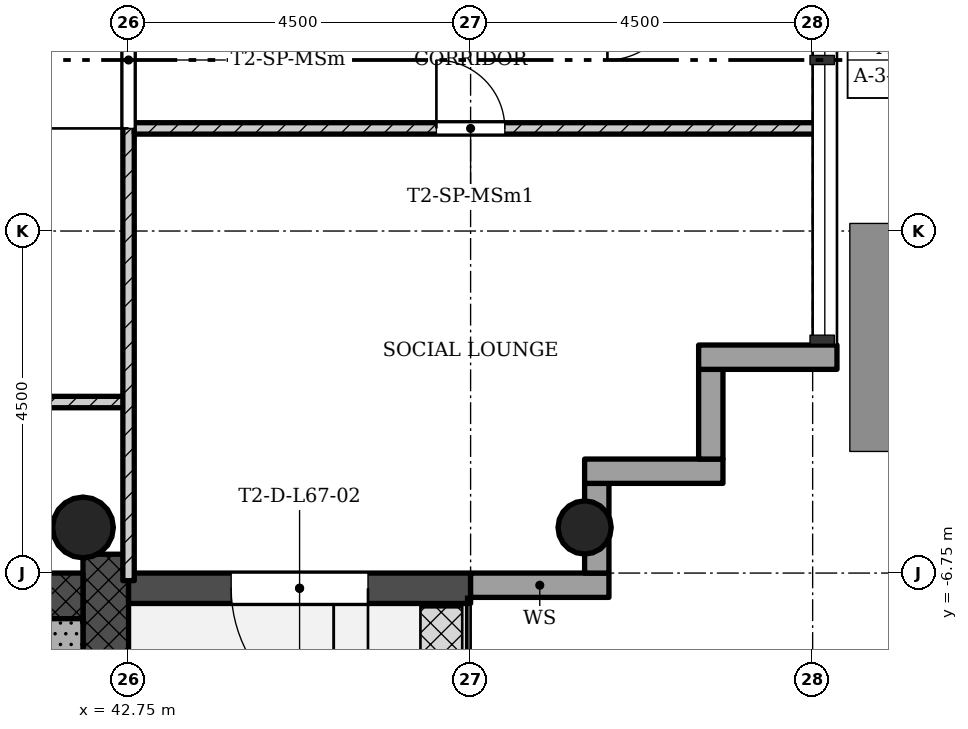
"""IFC4 building model, lengths in metres.
Left out: names, types, materials, properties, quantities, classifications, styles, units other than length and angle.
Written with IfcOpenShell. Run it as: python <this file> out.ifc"""

import sys

from ifc_helpers import new_model, si_unit, direction, frame, frame_2d, origin, origin_2d, place, context, subcontext, project, spatial, rectangle, hollow_circle, extrude, element, fill, save


model = new_model("IFC4")
c1 = context("Model", 3, precision=1e-05, world=origin(), true_north=direction((0.0, 1.0)))
c2 = subcontext(c1, "Body", "Model", "MODEL_VIEW")
j1 = project(units=[si_unit("LENGTHUNIT", "METRE"), si_unit("PLANEANGLEUNIT", "RADIAN")], contexts=[c1])
p1 = place(None, origin())
s1 = spatial("IfcSite", under=j1, at=p1, CompositionType="ELEMENT")
p2 = place(p1, origin())
s2 = spatial("IfcBuilding", under=s1, at=p2, CompositionType="ELEMENT")
p3 = place(p2, frame((0.0, 0.0, 242.4)))
s3 = spatial("IfcBuildingStorey", under=s2, at=p3, CompositionType="ELEMENT", Elevation=242.4)
p4 = place(p3, frame((42.45, -15.15, 0.0), z_axis=(0.0, 0.0, 1.0), x_axis=(0.0, 1.0, 0.0)))
e1 = element("IfcWall", 1, at=p4, inside=s3, PredefinedType="SHEAR", context=c2, shape_type="SweptSolid", body=[
    extrude(rectangle(XDim=8.648, YDim=0.6, at=frame_2d((4.324, 0.0))), origin(), (0.0, 0.0, 1.0), 4.5),
])
p5 = place(p3, frame((42.15, -7.05, 0.0), z_axis=(0.0, 0.0, 1.0), x_axis=(-1.0, 0.0, 0.0)))
e2 = element("IfcWall", 2, at=p5, inside=s3, PredefinedType="SHEAR", context=c2, shape_type="SweptSolid", body=[
    extrude(rectangle(XDim=12.9, YDim=0.6, at=frame_2d((6.45, 0.0))), origin(), (0.0, 0.0, 1.0), 4.5),
])
p6 = place(p5, frame((5.25, 0.0, 0.0)))
e3 = element("IfcOpeningElement", 3, at=p6, cuts=e2, PredefinedType="OPENING", context=c2, shape_type="SweptSolid", body=[
    extrude(rectangle(XDim=1.8, YDim=2.1, at=frame_2d((0.9, 1.05))), frame((0.0, 0.31, 0.0), z_axis=(0.0, -1.0, 0.0), x_axis=(1.0, 0.0, 0.0)), (0.0, 0.0, 1.0), 0.62),
])
p7 = place(p3, frame((48.75, -6.15, 0.0), z_axis=(0.0, 0.0, 1.0), x_axis=(1.0, 0.0, 0.0)))
e4 = element("IfcColumn", 4, at=p7, inside=s3, PredefinedType="COLUMN", context=c2, shape_type="SweptSolid", body=[
    extrude(hollow_circle(Radius=0.35, WallThickness=0.025, at=origin_2d()), origin(), (0.0, 0.0, 1.0), 4.5),
])
p8 = place(p3, frame((42.15, -6.15, 0.0), z_axis=(0.0, 0.0, 1.0), x_axis=(1.0, 0.0, 0.0)))
e5 = element("IfcColumn", 5, at=p8, inside=s3, PredefinedType="COLUMN", context=c2, shape_type="SweptSolid", body=[
    extrude(hollow_circle(Radius=0.4, WallThickness=0.028, at=origin_2d()), origin(), (0.0, 0.0, 1.0), 4.5),
])
p9 = place(p3, frame((42.75, -6.95, -0.02), z_axis=(0.0, 0.0, 1.0), x_axis=(1.0, 0.0, 0.0)))
e6 = element("IfcWall", 6, at=p9, inside=s3, PredefinedType="STANDARD", context=c2, shape_type="SweptSolid", body=[
    extrude(rectangle(XDim=4.5, YDim=0.4, at=frame_2d((2.25, 0.0))), origin(), (0.0, 0.0, 1.0), 4.22),
])
p10 = place(p9, frame((1.35, 0.0, 0.02)))
e7 = element("IfcOpeningElement", 7, at=p10, cuts=e6, PredefinedType="OPENING", context=c2, shape_type="SweptSolid", body=[
    extrude(rectangle(XDim=1.8, YDim=2.1, at=frame_2d((0.9, 1.05))), frame((0.0, 0.21, 0.0), z_axis=(0.0, -1.0, 0.0), x_axis=(1.0, 0.0, 0.0)), (0.0, 0.0, 1.0), 0.42),
])
p11 = place(p3, frame((47.25, -6.91, -0.3), z_axis=(0.0, 0.0, 1.0), x_axis=(1.0, 0.0, 0.0)))
e8 = element("IfcWall", 8, at=p11, inside=s3, PredefinedType="STANDARD", context=c2, shape_type="SweptSolid", body=[
    extrude(rectangle(XDim=1.82, YDim=0.32, at=frame_2d((0.91, 0.0))), origin(), (0.0, 0.0, 1.0), 4.5),
])
p12 = place(p3, frame((48.91, -6.75, -0.3), z_axis=(0.0, 0.0, 1.0), x_axis=(0.0, 1.0, 0.0)))
e9 = element("IfcWall", 9, at=p12, inside=s3, PredefinedType="STANDARD", context=c2, shape_type="SweptSolid", body=[
    extrude(rectangle(XDim=1.18, YDim=0.32, at=frame_2d((0.59, 0.0))), origin(), (0.0, 0.0, 1.0), 4.5),
])
p13 = place(p3, frame((48.75, -5.41, -0.3), z_axis=(0.0, 0.0, 1.0), x_axis=(1.0, 0.0, 0.0)))
e10 = element("IfcWall", 10, at=p13, inside=s3, PredefinedType="STANDARD", context=c2, shape_type="SweptSolid", body=[
    extrude(rectangle(XDim=1.82, YDim=0.32, at=frame_2d((0.91, 0.0))), origin(), (0.0, 0.0, 1.0), 4.5),
])
p14 = place(p3, frame((50.41, -5.25, -0.3), z_axis=(0.0, 0.0, 1.0), x_axis=(0.0, 1.0, 0.0)))
e11 = element("IfcWall", 11, at=p14, inside=s3, PredefinedType="STANDARD", context=c2, shape_type="SweptSolid", body=[
    extrude(rectangle(XDim=1.18, YDim=0.32, at=frame_2d((0.59, 0.0))), origin(), (0.0, 0.0, 1.0), 4.5),
])
p15 = place(p3, frame((50.25, -3.91, -0.3), z_axis=(0.0, 0.0, 1.0), x_axis=(1.0, 0.0, 0.0)))
e12 = element("IfcWall", 12, at=p15, inside=s3, PredefinedType="STANDARD", context=c2, shape_type="SweptSolid", body=[
    extrude(rectangle(XDim=1.82, YDim=0.32, at=frame_2d((0.91, 0.0))), origin(), (0.0, 0.0, 1.0), 4.5),
])
p16 = place(p3, frame((42.75, -4.5, 0.0), z_axis=(0.0, 0.0, 1.0), x_axis=(-1.0, 0.0, 0.0)))
e13 = element("IfcWall", 13, at=p16, inside=s3, PredefinedType="PARTITIONING", context=c2, shape_type="SweptSolid", body=[
    extrude(rectangle(XDim=4.5, YDim=0.15, at=frame_2d((2.25, 0.0))), origin(), (0.0, 0.0, 1.0), 4.08),
])
p17 = place(p16, frame((1.8, 0.0, 0.0)))
e14 = element("IfcOpeningElement", 14, at=p17, cuts=e13, PredefinedType="OPENING", context=c2, shape_type="SweptSolid", body=[
    extrude(rectangle(XDim=0.9, YDim=2.1, at=frame_2d((0.45, 1.05))), frame((0.0, 0.085, 0.0), z_axis=(0.0, -1.0, 0.0), x_axis=(1.0, 0.0, 0.0)), (0.0, 0.0, 1.0), 0.17),
])
p18 = place(p3, frame((42.75, -6.85, 0.0), z_axis=(0.0, 0.0, 1.0), x_axis=(0.0, 1.0, 0.0)))
e15 = element("IfcWall", 15, at=p18, inside=s3, PredefinedType="PARTITIONING", context=c2, shape_type="SweptSolid", body=[
    extrude(rectangle(XDim=13.7, YDim=0.15, at=frame_2d((6.85, 0.0))), origin(), (0.0, 0.0, 1.0), 4.08),
])
p19 = place(p18, frame((5.95, 0.0, 0.0)))
e16 = element("IfcOpeningElement", 16, at=p19, cuts=e15, PredefinedType="OPENING", context=c2, shape_type="SweptSolid", body=[
    extrude(rectangle(XDim=1.8, YDim=2.1, at=frame_2d((0.9, 1.05))), frame((0.0, 0.085, 0.0), z_axis=(0.0, -1.0, 0.0), x_axis=(1.0, 0.0, 0.0)), (0.0, 0.0, 1.0), 0.17),
])
p20 = place(p3, frame((51.85, -0.9, 0.0), z_axis=(0.0, 0.0, 1.0), x_axis=(-1.0, 0.0, 0.0)))
e17 = element("IfcWall", 17, at=p20, inside=s3, PredefinedType="PARTITIONING", context=c2, shape_type="SweptSolid", body=[
    extrude(rectangle(XDim=9.025, YDim=0.15, at=frame_2d((4.513, 0.0))), origin(), (0.0, 0.0, 1.0), 4.08),
])
p21 = place(p20, frame((4.15, 0.0, 0.0)))
e18 = element("IfcOpeningElement", 18, at=p21, cuts=e17, PredefinedType="OPENING", context=c2, shape_type="SweptSolid", body=[
    extrude(rectangle(XDim=0.9, YDim=2.1, at=frame_2d((0.45, 1.05))), frame((0.0, 0.085, 0.0), z_axis=(0.0, -1.0, 0.0), x_axis=(1.0, 0.0, 0.0)), (0.0, 0.0, 1.0), 0.17),
])
p22 = place(p3, frame((37.85, -7.65, 0.0), z_axis=(0.0, 0.0, 1.0), x_axis=(1.0, 0.0, 0.0)))
e19 = element("IfcWall", 19, at=p22, inside=s3, PredefinedType="SHEAR", context=c2, shape_type="SweptSolid", body=[
    extrude(rectangle(XDim=4.3, YDim=0.6, at=frame_2d((2.15, 0.0))), origin(), (0.0, 0.0, 1.0), 4.5),
])
p23 = place(p10, origin())
e20 = element("IfcDoor", 20, at=p23, inside=s3, OperationType="SINGLE_SWING_RIGHT", PredefinedType="DOOR", context=c2, shape_type="SweptSolid", body=[
    extrude(rectangle(XDim=1.8, YDim=2.1, at=frame_2d((0.9, 1.05))), frame((0.0, 0.025, 0.0), z_axis=(0.0, -1.0, 0.0), x_axis=(1.0, 0.0, 0.0)), (0.0, 0.0, 1.0), 0.05),
])
fill(e7, e20)
p24 = place(p19, origin())
e21 = element("IfcDoor", 21, at=p24, inside=s3, OperationType="SINGLE_SWING_RIGHT", PredefinedType="DOOR", context=c2, shape_type="SweptSolid", body=[
    extrude(rectangle(XDim=1.8, YDim=2.1, at=frame_2d((0.9, 1.05))), frame((0.0, 0.025, 0.0), z_axis=(0.0, -1.0, 0.0), x_axis=(1.0, 0.0, 0.0)), (0.0, 0.0, 1.0), 0.05),
])
fill(e16, e21)
p25 = place(p21, origin())
e22 = element("IfcDoor", 22, at=p25, inside=s3, OperationType="SINGLE_SWING_RIGHT", PredefinedType="DOOR", context=c2, shape_type="SweptSolid", body=[
    extrude(rectangle(XDim=0.9, YDim=2.1, at=frame_2d((0.45, 1.05))), frame((0.0, 0.025, 0.0), z_axis=(0.0, -1.0, 0.0), x_axis=(1.0, 0.0, 0.0)), (0.0, 0.0, 1.0), 0.05),
])
fill(e18, e22)
save(model, sys.argv[1])
